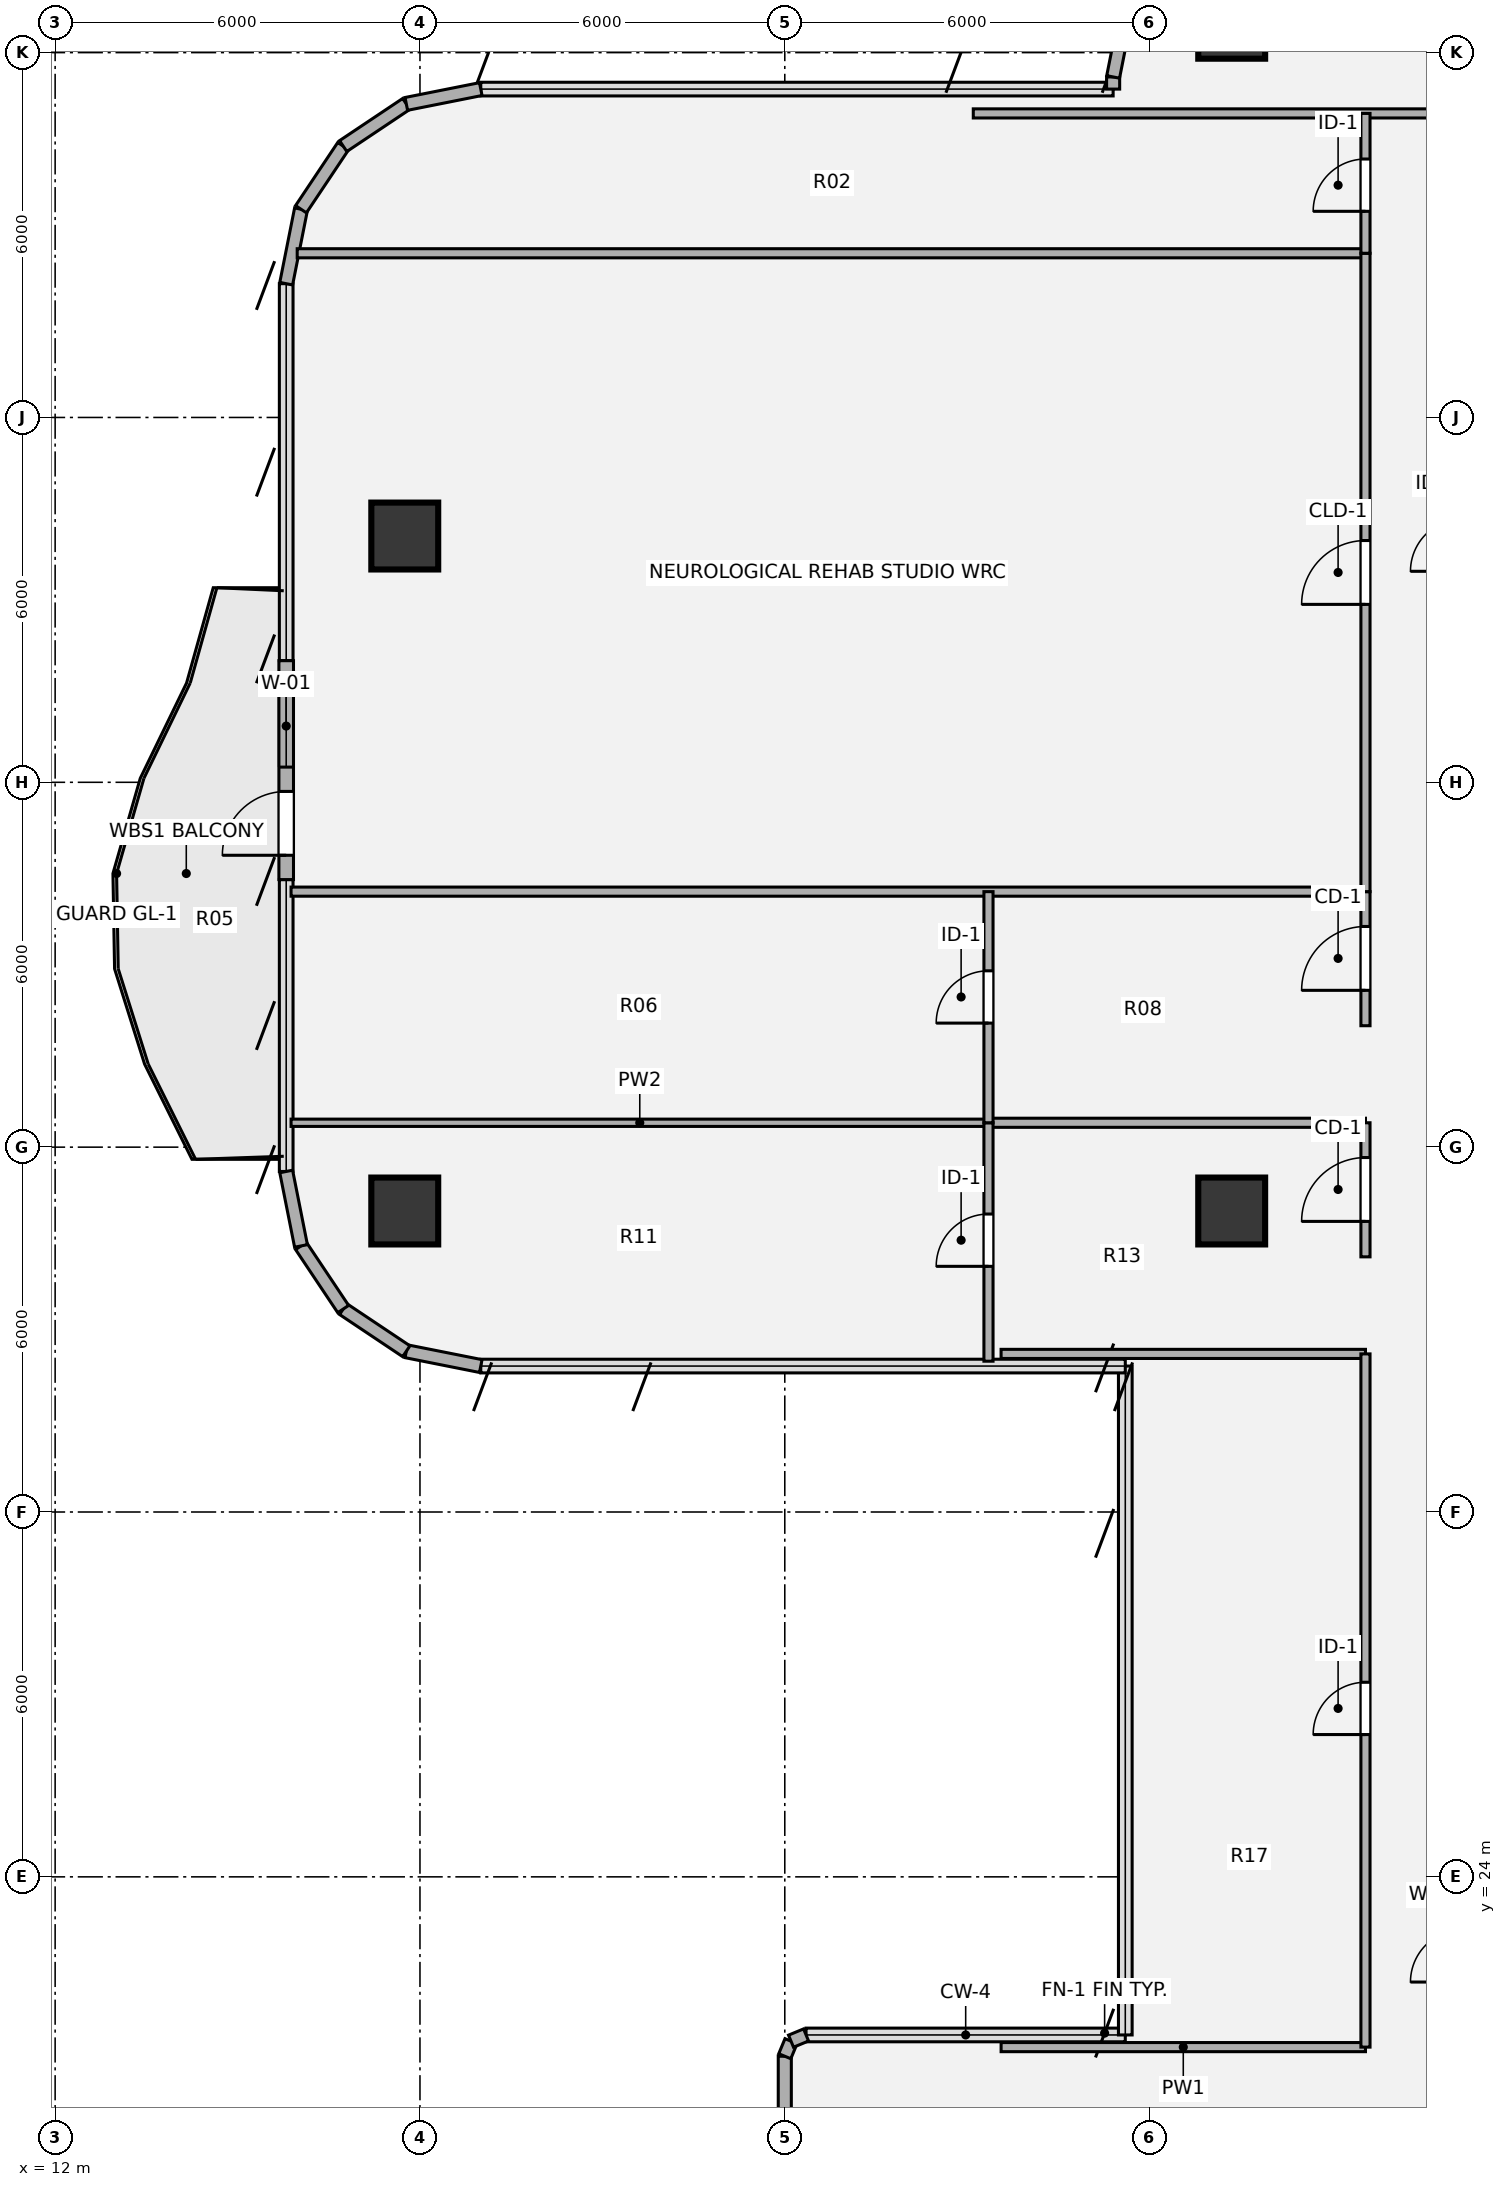
"""IFC4 building model, lengths in metres.
Left out: names, types, materials, properties, quantities, classifications, styles, units other than length and angle.
Written with IfcOpenShell. Run it as: python <this file> out.ifc"""

import sys

from ifc_helpers import new_model, si_unit, direction, frame, frame_2d, origin, origin_2d, place, context, subcontext, project, spatial, rectangle, hollow_circle, extrude, source, transform, mapped, element, fill, save


model = new_model("IFC4")
c1 = context("Model", 3, precision=1e-05, world=origin(), true_north=direction((0.0, 1.0)))
c2 = subcontext(c1, "Body", "Model", "MODEL_VIEW")
j1 = project(units=[si_unit("LENGTHUNIT", "METRE"), si_unit("PLANEANGLEUNIT", "RADIAN")], contexts=[c1])
p1 = place(None, origin())
s1 = spatial("IfcSite", under=j1, at=p1, CompositionType="ELEMENT")
p2 = place(p1, origin())
s2 = spatial("IfcBuilding", under=s1, at=p2, CompositionType="ELEMENT")
p3 = place(p2, frame((0.0, 0.0, 175.32)))
s3 = spatial("IfcBuildingStorey", under=s2, at=p3, CompositionType="ELEMENT", Elevation=175.32)
m1 = source(origin(), c2, "Body", "SweptSolid", [
    extrude(hollow_circle(Radius=0.55, WallThickness=0.04, at=origin_2d()), origin(), (0.0, 0.0, 1.0), 3.78),
])
for number, where, z_axis, x_axis in (
    (1, (17.75, 34.95, 0.0), (0.0, 0.0, 1.0), (1.0, 0.0, 0.0)),
    (2, (17.75, 46.05, 0.0), (0.0, 0.0, 1.0), (1.0, 0.0, 0.0)),
    (3, (31.35, 34.95, 0.0), (0.0, 0.0, 1.0), (1.0, 0.0, 0.0)),
    (4, (31.35, 54.45, 0.0), (0.0, 0.0, 1.0), (1.0, 0.0, 0.0)),
):
    element("IfcColumn", number, at=place(p3, frame(where, z_axis=z_axis, x_axis=x_axis)), inside=s3, PredefinedType="COLUMN", context=c2, shape_type="MappedRepresentation", body=[
        mapped(m1, transform((0.0, 0.0, 0.0), x_axis=(1.0, 0.0, 0.0), y_axis=(0.0, 1.0, 0.0), z_axis=(0.0, 0.0, 1.0), scale=1.0)),
    ])
p4 = place(p3, frame((24.0, 18.355, 0.0), z_axis=(0.0, 0.0, 1.0), x_axis=(0.0, 1.0, 0.0)))
e5 = element("IfcWall", 5, at=p4, inside=s3, PredefinedType="SOLIDWALL", context=c2, shape_type="SweptSolid", body=[
    extrude(rectangle(XDim=2.695, YDim=0.215, at=frame_2d((1.348, 0.0))), origin(), (0.0, 0.0, 1.0), 2.718),
])
p5 = place(p3, frame((24.0, 21.05, 0.0), z_axis=(0.0, 0.0, 1.0), x_axis=(0.382673670509, 0.923883575944, 0.0)))
e6 = element("IfcWall", 6, at=p5, inside=s3, PredefinedType="SOLIDWALL", context=c2, shape_type="SweptSolid", body=[
    extrude(rectangle(XDim=0.268, YDim=0.215, at=frame_2d((0.134, 0.0))), origin(), (0.0, 0.0, 1.0), 3.53),
])
p6 = place(p3, frame((24.103, 21.298, 0.0), z_axis=(0.0, 0.0, 1.0), x_axis=(0.924205486139, 0.381895560841, 0.0)))
e7 = element("IfcWall", 7, at=p6, inside=s3, PredefinedType="SOLIDWALL", context=c2, shape_type="SweptSolid", body=[
    extrude(rectangle(XDim=0.268, YDim=0.215, at=frame_2d((0.134, 0.0))), origin(), (0.0, 0.0, 1.0), 3.53),
])
for number, where, z_axis, x_axis in (
    (8, (19.0, 32.4, 0.0), (0.0, 0.0, 1.0), (-0.981, 0.195, 0.0)),
    (9, (17.775, 32.644, 0.0), (0.0, 0.0, 1.0), (-0.831, 0.556, 0.0)),
    (10, (16.737, 33.337, 0.0), (0.0, 0.0, 1.0), (-0.556, 0.831, 0.0)),
    (11, (16.044, 34.375, 0.0), (0.0, 0.0, 1.0), (-0.195, 0.981, 0.0)),
):
    element("IfcWall", number, at=place(p3, frame(where, z_axis=z_axis, x_axis=x_axis)), inside=s3, PredefinedType="SOLIDWALL", context=c2, shape_type="SweptSolid", body=[
        extrude(rectangle(XDim=1.249, YDim=0.215, at=frame_2d((0.624, 0.0))), origin(), (0.0, 0.0, 1.0), 3.53),
    ])
p7 = place(p3, frame((15.8, 40.4, 0.0), z_axis=(0.0, 0.0, 1.0), x_axis=(0.0, 1.0, 0.0)))
e12 = element("IfcWall", 12, at=p7, inside=s3, PredefinedType="SOLIDWALL", context=c2, shape_type="SweptSolid", body=[
    extrude(rectangle(XDim=3.6, YDim=0.24, at=frame_2d((1.8, 0.0))), origin(), (0.0, 0.0, 1.0), 3.53),
])
p8 = place(p7, frame((0.4, 0.0, 0.0)))
e13 = element("IfcOpeningElement", 13, at=p8, cuts=e12, PredefinedType="OPENING", context=c2, shape_type="SweptSolid", body=[
    extrude(rectangle(XDim=1.05, YDim=2.15, at=origin_2d()), frame((0.525, 0.13, 1.075), z_axis=(0.0, -1.0, 0.0), x_axis=(1.0, 0.0, 0.0)), (0.0, 0.0, 1.0), 0.26),
])
p9 = place(p7, frame((1.85, 0.0, 0.85)))
e14 = element("IfcOpeningElement", 14, at=p9, cuts=e12, PredefinedType="OPENING", context=c2, shape_type="SweptSolid", body=[
    extrude(rectangle(XDim=1.35, YDim=1.35, at=origin_2d()), frame((0.675, 0.13, 0.675), z_axis=(0.0, -1.0, 0.0), x_axis=(1.0, 0.0, 0.0)), (0.0, 0.0, 1.0), 0.26),
])
for number, where, z_axis, x_axis in (
    (15, (15.8, 50.2, 0.0), (0.0, 0.0, 1.0), (0.195, 0.981, 0.0)),
    (16, (16.044, 51.425, 0.0), (0.0, 0.0, 1.0), (0.556, 0.831, 0.0)),
    (17, (16.737, 52.463, 0.0), (0.0, 0.0, 1.0), (0.831, 0.556, 0.0)),
    (18, (17.775, 53.156, 0.0), (0.0, 0.0, 1.0), (0.981, 0.195, 0.0)),
):
    element("IfcWall", number, at=place(p3, frame(where, z_axis=z_axis, x_axis=x_axis)), inside=s3, PredefinedType="SOLIDWALL", context=c2, shape_type="SweptSolid", body=[
        extrude(rectangle(XDim=1.249, YDim=0.215, at=frame_2d((0.624, 0.0))), origin(), (0.0, 0.0, 1.0), 3.53),
    ])
p10 = place(p3, frame((29.4, 53.4, 0.0), z_axis=(0.0, 0.0, 1.0), x_axis=(0.0, 1.0, 0.0)))
e19 = element("IfcWall", 19, at=p10, inside=s3, PredefinedType="SOLIDWALL", context=c2, shape_type="SweptSolid", body=[
    extrude(rectangle(XDim=0.2, YDim=0.215, at=frame_2d((0.1, 0.0))), origin(), (0.0, 0.0, 1.0), 3.53),
])
p11 = place(p3, frame((29.4, 53.6, 0.0), z_axis=(0.0, 0.0, 1.0), x_axis=(0.195127417394, 0.980777900945, 0.0)))
e20 = element("IfcWall", 20, at=p11, inside=s3, PredefinedType="SOLIDWALL", context=c2, shape_type="SweptSolid", body=[
    extrude(rectangle(XDim=1.092, YDim=0.215, at=frame_2d((0.546, 0.0))), origin(), (0.0, 0.0, 1.0), 3.53),
])
p12 = place(p3, frame((27.558, 21.2, 0.0), z_axis=(0.0, 0.0, 1.0), x_axis=(1.0, 0.0, 0.0)))
e21 = element("IfcWall", 21, at=p12, inside=s3, PredefinedType="PARTITIONING", context=c2, shape_type="SweptSolid", body=[
    extrude(rectangle(XDim=5.992, YDim=0.15, at=frame_2d((2.996, 0.0))), origin(), (0.0, 0.0, 1.0), 3.5),
])
p13 = place(p3, frame((27.557, 32.6, 0.0), z_axis=(0.0, 0.0, 1.0), x_axis=(1.0, 0.0, 0.0)))
e22 = element("IfcWall", 22, at=p13, inside=s3, PredefinedType="PARTITIONING", context=c2, shape_type="SweptSolid", body=[
    extrude(rectangle(XDim=5.993, YDim=0.15, at=frame_2d((2.997, 0.0))), origin(), (0.0, 0.0, 1.0), 3.5),
])
p14 = place(p3, frame((15.88, 36.401, 0.0), z_axis=(0.0, 0.0, 1.0), x_axis=(1.0, 0.0, 0.0)))
e23 = element("IfcWall", 23, at=p14, inside=s3, PredefinedType="PARTITIONING", context=c2, shape_type="SweptSolid", body=[
    extrude(rectangle(XDim=11.47, YDim=0.12, at=frame_2d((5.735, 0.0))), origin(), (0.0, 0.0, 1.0), 2.982),
])
p15 = place(p3, frame((27.35, 36.401, 0.0), z_axis=(0.0, 0.0, 1.0), x_axis=(1.0, 0.0, 0.0)))
e24 = element("IfcWall", 24, at=p15, inside=s3, PredefinedType="PARTITIONING", context=c2, shape_type="SweptSolid", body=[
    extrude(rectangle(XDim=6.2, YDim=0.15, at=frame_2d((3.1, 0.0))), origin(), (0.0, 0.0, 1.0), 2.982),
])
p16 = place(p3, frame((15.88, 40.202, 0.0), z_axis=(0.0, 0.0, 1.0), x_axis=(1.0, 0.0, 0.0)))
e25 = element("IfcWall", 25, at=p16, inside=s3, PredefinedType="PARTITIONING", context=c2, shape_type="SweptSolid", body=[
    extrude(rectangle(XDim=17.67, YDim=0.15, at=frame_2d((8.835, 0.0))), origin(), (0.0, 0.0, 1.0), 2.982),
])
p17 = place(p3, frame((15.981, 50.7, 0.0), z_axis=(0.0, 0.0, 1.0), x_axis=(1.0, 0.0, 0.0)))
e26 = element("IfcWall", 26, at=p17, inside=s3, PredefinedType="PARTITIONING", context=c2, shape_type="SweptSolid", body=[
    extrude(rectangle(XDim=17.569, YDim=0.15, at=frame_2d((8.785, 0.0))), origin(), (0.0, 0.0, 1.0), 3.308),
])
p18 = place(p3, frame((27.1, 53.0, 0.0), z_axis=(0.0, 0.0, 1.0), x_axis=(1.0, 0.0, 0.0)))
e27 = element("IfcWall", 27, at=p18, inside=s3, PredefinedType="PARTITIONING", context=c2, shape_type="SweptSolid", body=[
    extrude(rectangle(XDim=17.8, YDim=0.15, at=frame_2d((8.9, 0.0))), origin(), (0.0, 0.0, 1.0), 3.308),
])
p19 = place(p18, frame((8.375, 0.0, 0.0)))
e28 = element("IfcOpeningElement", 28, at=p19, cuts=e27, PredefinedType="OPENING", context=c2, shape_type="SweptSolid", body=[
    extrude(rectangle(XDim=1.05, YDim=2.1, at=origin_2d()), frame((0.525, 0.085, 1.05), z_axis=(0.0, -1.0, 0.0), x_axis=(1.0, 0.0, 0.0)), (0.0, 0.0, 1.0), 0.17),
])
p20 = place(p3, frame((27.35, 32.48, 0.0), z_axis=(0.0, 0.0, 1.0), x_axis=(0.0, 1.0, 0.0)))
e29 = element("IfcWall", 29, at=p20, inside=s3, PredefinedType="PARTITIONING", context=c2, shape_type="SweptSolid", body=[
    extrude(rectangle(XDim=3.921, YDim=0.15, at=frame_2d((1.96, 0.0))), origin(), (0.0, 0.0, 1.0), 3.5),
])
p21 = place(p20, frame((1.56, 0.0, 0.0)))
e30 = element("IfcOpeningElement", 30, at=p21, cuts=e29, PredefinedType="OPENING", context=c2, shape_type="SweptSolid", body=[
    extrude(rectangle(XDim=0.86, YDim=2.1, at=origin_2d()), frame((0.43, 0.085, 1.05), z_axis=(0.0, -1.0, 0.0), x_axis=(1.0, 0.0, 0.0)), (0.0, 0.0, 1.0), 0.17),
])
p22 = place(p3, frame((27.35, 36.401, 0.0), z_axis=(0.0, 0.0, 1.0), x_axis=(0.0, 1.0, 0.0)))
e31 = element("IfcWall", 31, at=p22, inside=s3, PredefinedType="PARTITIONING", context=c2, shape_type="SweptSolid", body=[
    extrude(rectangle(XDim=3.801, YDim=0.15, at=frame_2d((1.9, 0.0))), origin(), (0.0, 0.0, 1.0), 3.5),
])
p23 = place(p22, frame((1.639, 0.0, 0.0)))
e32 = element("IfcOpeningElement", 32, at=p23, cuts=e31, PredefinedType="OPENING", context=c2, shape_type="SweptSolid", body=[
    extrude(rectangle(XDim=0.86, YDim=2.1, at=origin_2d()), frame((0.43, 0.085, 1.05), z_axis=(0.0, -1.0, 0.0), x_axis=(1.0, 0.0, 0.0)), (0.0, 0.0, 1.0), 0.17),
])
p24 = place(p3, frame((33.55, 21.2, 0.0), z_axis=(0.0, 0.0, 1.0), x_axis=(0.0, 1.0, 0.0)))
e33 = element("IfcWall", 33, at=p24, inside=s3, PredefinedType="PARTITIONING", context=c2, shape_type="SweptSolid", body=[
    extrude(rectangle(XDim=11.4, YDim=0.15, at=frame_2d((5.7, 0.0))), origin(), (0.0, 0.0, 1.0), 3.5),
])
p25 = place(p24, frame((5.14, 0.0, 0.0)))
e34 = element("IfcOpeningElement", 34, at=p25, cuts=e33, PredefinedType="OPENING", context=c2, shape_type="SweptSolid", body=[
    extrude(rectangle(XDim=0.86, YDim=2.1, at=origin_2d()), frame((0.43, 0.085, 1.05), z_axis=(0.0, -1.0, 0.0), x_axis=(1.0, 0.0, 0.0)), (0.0, 0.0, 1.0), 0.17),
])
p26 = place(p3, frame((33.55, 34.196, 0.0), z_axis=(0.0, 0.0, 1.0), x_axis=(0.0, 1.0, 0.0)))
e35 = element("IfcWall", 35, at=p26, inside=s3, PredefinedType="PARTITIONING", context=c2, shape_type="SweptSolid", body=[
    extrude(rectangle(XDim=2.205, YDim=0.15, at=frame_2d((1.103, 0.0))), origin(), (0.0, 0.0, 1.0), 3.5),
])
p27 = place(p26, frame((0.583, 0.0, 0.0)))
e36 = element("IfcOpeningElement", 36, at=p27, cuts=e35, PredefinedType="OPENING", context=c2, shape_type="SweptSolid", body=[
    extrude(rectangle(XDim=1.05, YDim=2.1, at=origin_2d()), frame((0.525, 0.085, 1.05), z_axis=(0.0, -1.0, 0.0), x_axis=(1.0, 0.0, 0.0)), (0.0, 0.0, 1.0), 0.17),
])
p28 = place(p3, frame((33.55, 37.997, 0.0), z_axis=(0.0, 0.0, 1.0), x_axis=(0.0, 1.0, 0.0)))
e37 = element("IfcWall", 37, at=p28, inside=s3, PredefinedType="PARTITIONING", context=c2, shape_type="SweptSolid", body=[
    extrude(rectangle(XDim=2.205, YDim=0.15, at=frame_2d((1.103, 0.0))), origin(), (0.0, 0.0, 1.0), 3.5),
])
p29 = place(p28, frame((0.582, 0.0, 0.0)))
e38 = element("IfcOpeningElement", 38, at=p29, cuts=e37, PredefinedType="OPENING", context=c2, shape_type="SweptSolid", body=[
    extrude(rectangle(XDim=1.05, YDim=2.1, at=origin_2d()), frame((0.525, 0.085, 1.05), z_axis=(0.0, -1.0, 0.0), x_axis=(1.0, 0.0, 0.0)), (0.0, 0.0, 1.0), 0.17),
])
p30 = place(p3, frame((33.55, 40.202, 0.0), z_axis=(0.0, 0.0, 1.0), x_axis=(0.0, 1.0, 0.0)))
e39 = element("IfcWall", 39, at=p30, inside=s3, PredefinedType="PARTITIONING", context=c2, shape_type="SweptSolid", body=[
    extrude(rectangle(XDim=10.498, YDim=0.15, at=frame_2d((5.249, 0.0))), origin(), (0.0, 0.0, 1.0), 3.5),
])
p31 = place(p30, frame((4.724, 0.0, 0.0)))
e40 = element("IfcOpeningElement", 40, at=p31, cuts=e39, PredefinedType="OPENING", context=c2, shape_type="SweptSolid", body=[
    extrude(rectangle(XDim=1.05, YDim=2.1, at=origin_2d()), frame((0.525, 0.085, 1.05), z_axis=(0.0, -1.0, 0.0), x_axis=(1.0, 0.0, 0.0)), (0.0, 0.0, 1.0), 0.17),
])
p32 = place(p3, frame((33.55, 50.7, 0.0), z_axis=(0.0, 0.0, 1.0), x_axis=(0.0, 1.0, 0.0)))
e41 = element("IfcWall", 41, at=p32, inside=s3, PredefinedType="PARTITIONING", context=c2, shape_type="SweptSolid", body=[
    extrude(rectangle(XDim=2.3, YDim=0.15, at=frame_2d((1.15, 0.0))), origin(), (0.0, 0.0, 1.0), 3.5),
])
p33 = place(p32, frame((0.69, 0.0, 0.0)))
e42 = element("IfcOpeningElement", 42, at=p33, cuts=e41, PredefinedType="OPENING", context=c2, shape_type="SweptSolid", body=[
    extrude(rectangle(XDim=0.86, YDim=2.1, at=origin_2d()), frame((0.43, 0.085, 1.05), z_axis=(0.0, -1.0, 0.0), x_axis=(1.0, 0.0, 0.0)), (0.0, 0.0, 1.0), 0.17),
])
m2 = source(origin(), c2, "Body", "SweptSolid", [
    extrude(rectangle(XDim=1.05, YDim=2.15, at=origin_2d()), frame((0.525, 0.025, 1.075), z_axis=(0.0, -1.0, 0.0), x_axis=(1.0, 0.0, 0.0)), (0.0, 0.0, 1.0), 0.05),
])
p34 = place(p8, origin())
e43 = element("IfcDoor", 43, at=p34, inside=s3, OperationType="SINGLE_SWING_LEFT", PredefinedType="DOOR", context=c2, shape_type="MappedRepresentation", body=[
    mapped(m2, transform((0.0, 0.0, 0.0), x_axis=(1.0, 0.0, 0.0), y_axis=(0.0, 1.0, 0.0), z_axis=(0.0, 0.0, 1.0), scale=1.0)),
])
fill(e13, e43)
m3 = source(origin(), c2, "Body", "SweptSolid", [
    extrude(rectangle(XDim=1.35, YDim=1.35, at=origin_2d()), frame((0.675, 0.03, 0.675), z_axis=(0.0, -1.0, 0.0), x_axis=(1.0, 0.0, 0.0)), (0.0, 0.0, 1.0), 0.06),
])
p35 = place(p9, origin())
e44 = element("IfcWindow", 44, at=p35, inside=s3, PartitioningType="SINGLE_PANEL", PredefinedType="WINDOW", context=c2, shape_type="MappedRepresentation", body=[
    mapped(m3, transform((0.0, 0.0, 0.0), x_axis=(1.0, 0.0, 0.0), y_axis=(0.0, 1.0, 0.0), z_axis=(0.0, 0.0, 1.0), scale=1.0)),
])
fill(e14, e44)
m4 = source(origin(), c2, "Body", "SweptSolid", [
    extrude(rectangle(XDim=0.86, YDim=2.1, at=origin_2d()), frame((0.43, 0.025, 1.05), z_axis=(0.0, -1.0, 0.0), x_axis=(1.0, 0.0, 0.0)), (0.0, 0.0, 1.0), 0.05),
])
p36 = place(p21, origin())
e45 = element("IfcDoor", 45, at=p36, inside=s3, OperationType="SINGLE_SWING_LEFT", PredefinedType="DOOR", context=c2, shape_type="MappedRepresentation", body=[
    mapped(m4, transform((0.0, 0.0, 0.0), x_axis=(1.0, 0.0, 0.0), y_axis=(0.0, 1.0, 0.0), z_axis=(0.0, 0.0, 1.0), scale=1.0)),
])
fill(e30, e45)
p37 = place(p23, origin())
e46 = element("IfcDoor", 46, at=p37, inside=s3, OperationType="SINGLE_SWING_LEFT", PredefinedType="DOOR", context=c2, shape_type="MappedRepresentation", body=[
    mapped(m4, transform((0.0, 0.0, 0.0), x_axis=(1.0, 0.0, 0.0), y_axis=(0.0, 1.0, 0.0), z_axis=(0.0, 0.0, 1.0), scale=1.0)),
])
fill(e32, e46)
p38 = place(p25, origin())
e47 = element("IfcDoor", 47, at=p38, inside=s3, OperationType="SINGLE_SWING_LEFT", PredefinedType="DOOR", context=c2, shape_type="MappedRepresentation", body=[
    mapped(m4, transform((0.0, 0.0, 0.0), x_axis=(1.0, 0.0, 0.0), y_axis=(0.0, 1.0, 0.0), z_axis=(0.0, 0.0, 1.0), scale=1.0)),
])
fill(e34, e47)
m5 = source(origin(), c2, "Body", "SweptSolid", [
    extrude(rectangle(XDim=1.05, YDim=2.1, at=origin_2d()), frame((0.525, 0.025, 1.05), z_axis=(0.0, -1.0, 0.0), x_axis=(1.0, 0.0, 0.0)), (0.0, 0.0, 1.0), 0.05),
])
p39 = place(p27, origin())
e48 = element("IfcDoor", 48, at=p39, inside=s3, OperationType="SINGLE_SWING_LEFT", PredefinedType="DOOR", context=c2, shape_type="MappedRepresentation", body=[
    mapped(m5, transform((0.0, 0.0, 0.0), x_axis=(1.0, 0.0, 0.0), y_axis=(0.0, 1.0, 0.0), z_axis=(0.0, 0.0, 1.0), scale=1.0)),
])
fill(e36, e48)
p40 = place(p29, origin())
e49 = element("IfcDoor", 49, at=p40, inside=s3, OperationType="SINGLE_SWING_LEFT", PredefinedType="DOOR", context=c2, shape_type="MappedRepresentation", body=[
    mapped(m5, transform((0.0, 0.0, 0.0), x_axis=(1.0, 0.0, 0.0), y_axis=(0.0, 1.0, 0.0), z_axis=(0.0, 0.0, 1.0), scale=1.0)),
])
fill(e38, e49)
m6 = source(origin(), c2, "Body", "SweptSolid", [
    extrude(rectangle(XDim=1.05, YDim=2.1, at=origin_2d()), frame((0.525, 0.025, 1.05), z_axis=(0.0, -1.0, 0.0), x_axis=(1.0, 0.0, 0.0)), (0.0, 0.0, 1.0), 0.05),
])
p41 = place(p31, origin())
e50 = element("IfcDoor", 50, at=p41, inside=s3, OperationType="SINGLE_SWING_LEFT", PredefinedType="DOOR", context=c2, shape_type="MappedRepresentation", body=[
    mapped(m6, transform((0.0, 0.0, 0.0), x_axis=(1.0, 0.0, 0.0), y_axis=(0.0, 1.0, 0.0), z_axis=(0.0, 0.0, 1.0), scale=1.0)),
])
fill(e40, e50)
p42 = place(p33, origin())
e51 = element("IfcDoor", 51, at=p42, inside=s3, OperationType="SINGLE_SWING_LEFT", PredefinedType="DOOR", context=c2, shape_type="MappedRepresentation", body=[
    mapped(m4, transform((0.0, 0.0, 0.0), x_axis=(1.0, 0.0, 0.0), y_axis=(0.0, 1.0, 0.0), z_axis=(0.0, 0.0, 1.0), scale=1.0)),
])
fill(e42, e51)
save(model, sys.argv[1])
